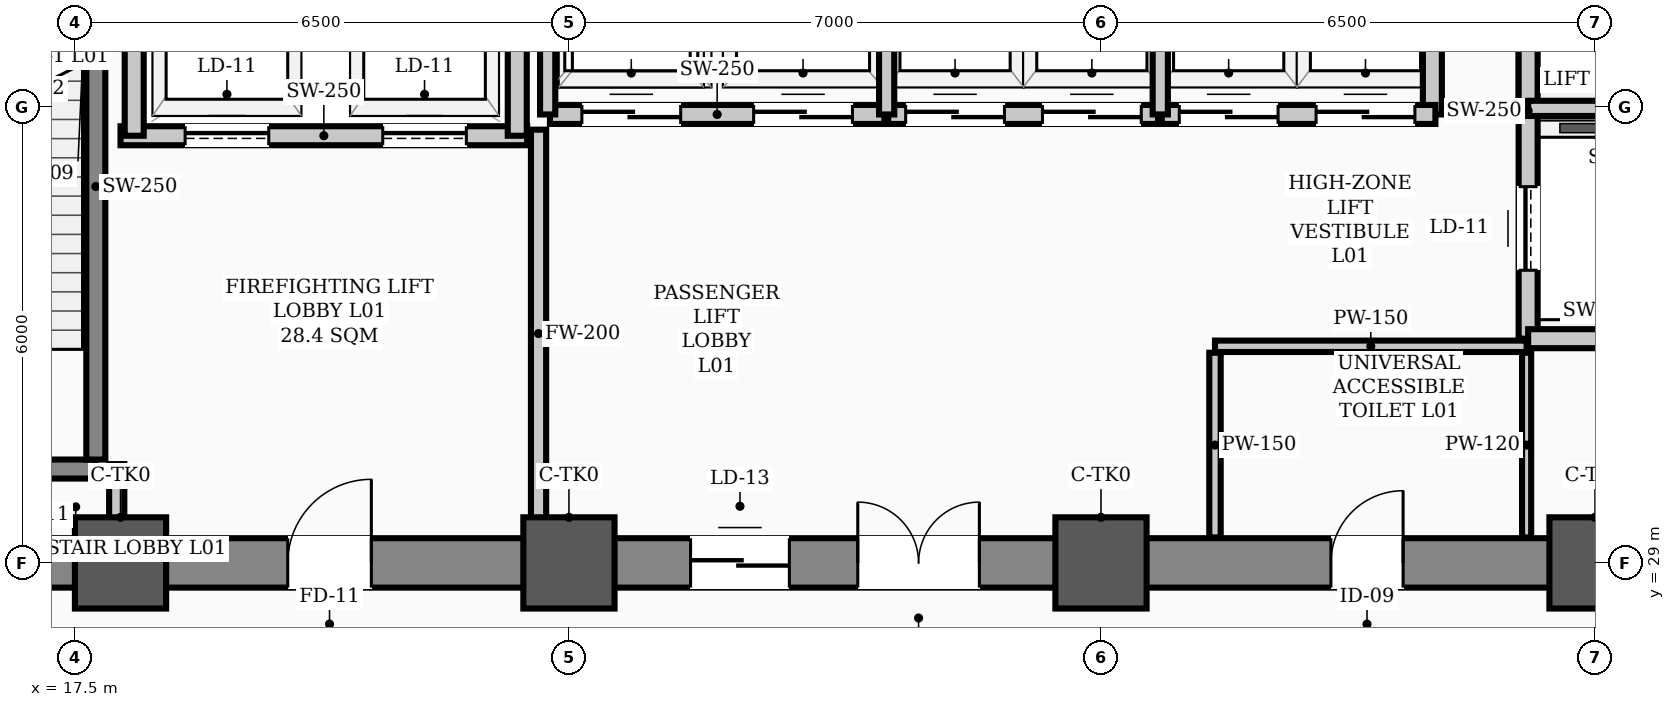
"""IFC4 building model, lengths in metres.
Left out: names, types, materials, properties, quantities, classifications, styles, units other than length and angle.
Written with IfcOpenShell. Run it as: python <this file> out.ifc"""

import sys

from ifc_helpers import new_model, si_unit, direction, frame, frame_2d, origin, origin_2d, place, context, subcontext, project, spatial, rectangle, hollow_rectangle, extrude, element, fill, save


model = new_model("IFC4")
c1 = context("Model", 3, precision=1e-05, world=origin(), true_north=direction((0.0, 1.0)))
c2 = subcontext(c1, "Body", "Model", "MODEL_VIEW")
j1 = project(units=[si_unit("LENGTHUNIT", "METRE"), si_unit("PLANEANGLEUNIT", "RADIAN")], contexts=[c1])
p1 = place(None, origin())
s1 = spatial("IfcSite", under=j1, at=p1, CompositionType="ELEMENT")
p2 = place(p1, origin())
s2 = spatial("IfcBuilding", under=s1, at=p2, CompositionType="ELEMENT")
p3 = place(p2, origin())
s3 = spatial("IfcBuildingStorey", under=s2, at=p3, CompositionType="ELEMENT", Elevation=0.0)
for number, where, z_axis, x_axis in (
    (1, (18.1, 29.0, 0.0), (0.0, 0.0, 1.0), (1.0, 0.0, 0.0)),
    (2, (24.0, 29.0, 0.0), (0.0, 0.0, 1.0), (1.0, 0.0, 0.0)),
    (3, (31.0, 29.0, 0.0), (0.0, 0.0, 1.0), (1.0, 0.0, 0.0)),
    (4, (37.5, 29.0, 0.0), (0.0, 0.0, 1.0), (1.0, 0.0, 0.0)),
):
    element("IfcColumn", number, at=place(p3, frame(where, z_axis=z_axis, x_axis=x_axis)), inside=s3, PredefinedType="COLUMN", context=c2, shape_type="SweptSolid", body=[
        extrude(hollow_rectangle(XDim=1.2, YDim=1.2, WallThickness=0.04, InnerFilletRadius=0.02, OuterFilletRadius=0.06, at=origin_2d()), origin(), (0.0, 0.0, 1.0), 5.8),
    ])
p4 = place(p3, frame((13.5, 29.0, 0.0), z_axis=(0.0, 0.0, 1.0), x_axis=(1.0, 0.0, 0.0)))
e5 = element("IfcWall", 5, at=p4, inside=s3, PredefinedType="SHEAR", context=c2, shape_type="SweptSolid", body=[
    extrude(rectangle(XDim=30.5, YDim=0.65, at=frame_2d((15.25, 0.0))), origin(), (0.0, 0.0, 1.0), 5.55),
])
p5 = place(p4, frame((1.75, 0.0, 0.0)))
e6 = element("IfcOpeningElement", 6, at=p5, cuts=e5, PredefinedType="OPENING", context=c2, shape_type="SweptSolid", body=[
    extrude(rectangle(XDim=1.1, YDim=2.08, at=frame_2d((0.55, 1.04))), frame((0.0, 0.335, 0.0), z_axis=(0.0, -1.0, 0.0), x_axis=(1.0, 0.0, 0.0)), (0.0, 0.0, 1.0), 0.67),
])
p6 = place(p4, frame((26.7, 0.0, 0.0)))
e7 = element("IfcOpeningElement", 7, at=p6, cuts=e5, PredefinedType="OPENING", context=c2, shape_type="SweptSolid", body=[
    extrude(rectangle(XDim=1.1, YDim=2.08, at=frame_2d((0.55, 1.04))), frame((0.0, 0.335, 0.0), z_axis=(0.0, -1.0, 0.0), x_axis=(1.0, 0.0, 0.0)), (0.0, 0.0, 1.0), 0.67),
])
p7 = place(p4, frame((6.8, 0.0, 0.0)))
e8 = element("IfcOpeningElement", 8, at=p7, cuts=e5, PredefinedType="OPENING", context=c2, shape_type="SweptSolid", body=[
    extrude(rectangle(XDim=1.1, YDim=2.08, at=frame_2d((0.55, 1.04))), frame((0.0, 0.335, 0.0), z_axis=(0.0, -1.0, 0.0), x_axis=(1.0, 0.0, 0.0)), (0.0, 0.0, 1.0), 0.67),
])
p8 = place(p4, frame((14.3, 0.0, 0.0)))
e9 = element("IfcOpeningElement", 9, at=p8, cuts=e5, PredefinedType="OPENING", context=c2, shape_type="SweptSolid", body=[
    extrude(rectangle(XDim=1.6, YDim=2.08, at=frame_2d((0.8, 1.04))), frame((0.0, 0.335, 0.0), z_axis=(0.0, -1.0, 0.0), x_axis=(1.0, 0.0, 0.0)), (0.0, 0.0, 1.0), 0.67),
])
p9 = place(p4, frame((20.525, 0.0, 0.0)))
e10 = element("IfcOpeningElement", 10, at=p9, cuts=e5, PredefinedType="OPENING", context=c2, shape_type="SweptSolid", body=[
    extrude(rectangle(XDim=0.95, YDim=2.08, at=frame_2d((0.475, 1.04))), frame((0.0, 0.335, 0.0), z_axis=(0.0, -1.0, 0.0), x_axis=(1.0, 0.0, 0.0)), (0.0, 0.0, 1.0), 0.67),
])
p10 = place(p4, frame((12.1, 0.0, 0.0)))
e11 = element("IfcOpeningElement", 11, at=p10, cuts=e5, PredefinedType="OPENING", context=c2, shape_type="SweptSolid", body=[
    extrude(rectangle(XDim=1.3, YDim=2.08, at=frame_2d((0.65, 1.04))), frame((0.0, 0.335, 0.0), z_axis=(0.0, -1.0, 0.0), x_axis=(1.0, 0.0, 0.0)), (0.0, 0.0, 1.0), 0.67),
])
p11 = place(p3, frame((14.43, 30.235, 0.0), z_axis=(0.0, 0.0, 1.0), x_axis=(1.0, 0.0, 0.0)))
e12 = element("IfcWall", 12, at=p11, inside=s3, PredefinedType="STANDARD", context=c2, shape_type="SweptSolid", body=[
    extrude(rectangle(XDim=3.34, YDim=0.25, at=frame_2d((1.67, 0.0))), origin(), (0.0, 0.0, 1.0), 5.55),
])
p12 = place(p11, frame((1.1, 0.0, 0.0)))
e13 = element("IfcOpeningElement", 13, at=p12, cuts=e12, PredefinedType="OPENING", context=c2, shape_type="SweptSolid", body=[
    extrude(rectangle(XDim=1.1, YDim=2.08, at=frame_2d((0.55, 1.04))), frame((0.0, 0.135, 0.0), z_axis=(0.0, -1.0, 0.0), x_axis=(1.0, 0.0, 0.0)), (0.0, 0.0, 1.0), 0.27),
])
p13 = place(p3, frame((17.775, 30.36, 0.0), z_axis=(0.0, 0.0, 1.0), x_axis=(0.0, 1.0, 0.0)))
e14 = element("IfcWall", 14, at=p13, inside=s3, PredefinedType="STANDARD", context=c2, shape_type="SweptSolid", body=[
    extrude(rectangle(XDim=7.184, YDim=0.25, at=frame_2d((3.592, 0.0))), origin(), (0.0, 0.0, 1.0), 5.55),
])
p14 = place(p3, frame((18.1, 34.62, 0.0), z_axis=(0.0, 0.0, 1.0), x_axis=(1.0, 0.0, 0.0)))
e15 = element("IfcWall", 15, at=p14, inside=s3, PredefinedType="STANDARD", context=c2, shape_type="SweptSolid", body=[
    extrude(rectangle(XDim=5.35, YDim=0.25, at=frame_2d((2.675, 0.0))), origin(), (0.0, 0.0, 1.0), 5.55),
])
p15 = place(p14, frame((0.85, 0.0, 0.0)))
e16 = element("IfcOpeningElement", 16, at=p15, cuts=e15, PredefinedType="OPENING", context=c2, shape_type="SweptSolid", body=[
    extrude(rectangle(XDim=1.1, YDim=2.08, at=frame_2d((0.55, 1.04))), frame((0.0, 0.135, 0.0), z_axis=(0.0, -1.0, 0.0), x_axis=(1.0, 0.0, 0.0)), (0.0, 0.0, 1.0), 0.27),
])
p16 = place(p14, frame((3.45, 0.0, 0.0)))
e17 = element("IfcOpeningElement", 17, at=p16, cuts=e15, PredefinedType="OPENING", context=c2, shape_type="SweptSolid", body=[
    extrude(rectangle(XDim=1.1, YDim=2.08, at=frame_2d((0.55, 1.04))), frame((0.0, 0.135, 0.0), z_axis=(0.0, -1.0, 0.0), x_axis=(1.0, 0.0, 0.0)), (0.0, 0.0, 1.0), 0.27),
])
p17 = place(p3, frame((36.62, 31.95, 0.0), z_axis=(0.0, 0.0, 1.0), x_axis=(0.0, 1.0, 0.0)))
e18 = element("IfcWall", 18, at=p17, inside=s3, PredefinedType="STANDARD", context=c2, shape_type="SweptSolid", body=[
    extrude(rectangle(XDim=6.0, YDim=0.25, at=frame_2d((3.0, 0.0))), origin(), (0.0, 0.0, 1.0), 4.73),
])
p18 = place(p17, frame((0.9, 0.0, 0.0)))
e19 = element("IfcOpeningElement", 19, at=p18, cuts=e18, PredefinedType="OPENING", context=c2, shape_type="SweptSolid", body=[
    extrude(rectangle(XDim=1.1, YDim=2.08, at=frame_2d((0.55, 1.04))), frame((0.0, 0.135, 0.0), z_axis=(0.0, -1.0, 0.0), x_axis=(1.0, 0.0, 0.0)), (0.0, 0.0, 1.0), 0.27),
])
p19 = place(p17, frame((4.0, 0.0, 0.0)))
e20 = element("IfcOpeningElement", 20, at=p19, cuts=e18, PredefinedType="OPENING", context=c2, shape_type="SweptSolid", body=[
    extrude(rectangle(XDim=1.1, YDim=2.08, at=frame_2d((0.55, 1.04))), frame((0.0, 0.135, 0.0), z_axis=(0.0, -1.0, 0.0), x_axis=(1.0, 0.0, 0.0)), (0.0, 0.0, 1.0), 0.27),
])
p20 = place(p3, frame((36.62, 31.95, 0.0), z_axis=(0.0, 0.0, 1.0), x_axis=(1.0, 0.0, 0.0)))
e21 = element("IfcWall", 21, at=p20, inside=s3, PredefinedType="STANDARD", context=c2, shape_type="SweptSolid", body=[
    extrude(rectangle(XDim=1.9, YDim=0.25, at=frame_2d((0.95, 0.0))), origin(), (0.0, 0.0, 1.0), 5.38),
])
for number, where, z_axis, x_axis in (
    (22, (18.28, 34.62, 0.0), (0.0, 0.0, 1.0), (0.0, 1.0, 0.0)),
    (23, (23.32, 34.62, 0.0), (0.0, 0.0, 1.0), (0.0, 1.0, 0.0)),
):
    element("IfcWall", number, at=place(p3, frame(where, z_axis=z_axis, x_axis=x_axis)), inside=s3, PredefinedType="STANDARD", context=c2, shape_type="SweptSolid", body=[
        extrude(rectangle(XDim=3.33, YDim=0.25, at=frame_2d((1.665, 0.0))), origin(), (0.0, 0.0, 1.0), 4.73),
    ])
p21 = place(p3, frame((35.36, 34.9, 0.0), z_axis=(0.0, 0.0, 1.0), x_axis=(0.0, 1.0, 0.0)))
e24 = element("IfcWall", 24, at=p21, inside=s3, PredefinedType="STANDARD", context=c2, shape_type="SweptSolid", body=[
    extrude(rectangle(XDim=3.05, YDim=0.25, at=frame_2d((1.525, 0.0))), origin(), (0.0, 0.0, 1.0), 4.73),
])
p22 = place(p3, frame((23.75, 34.9, 0.0), z_axis=(0.0, 0.0, 1.0), x_axis=(1.0, 0.0, 0.0)))
e25 = element("IfcWall", 25, at=p22, inside=s3, PredefinedType="STANDARD", context=c2, shape_type="SweptSolid", body=[
    extrude(rectangle(XDim=4.4, YDim=0.25, at=frame_2d((2.2, 0.0))), origin(), (0.0, 0.0, 1.0), 5.55),
])
p23 = place(p22, frame((0.42, 0.0, 0.0)))
e26 = element("IfcOpeningElement", 26, at=p23, cuts=e25, PredefinedType="OPENING", context=c2, shape_type="SweptSolid", body=[
    extrude(rectangle(XDim=1.3, YDim=2.08, at=frame_2d((0.65, 1.04))), frame((0.0, 0.135, 0.0), z_axis=(0.0, -1.0, 0.0), x_axis=(1.0, 0.0, 0.0)), (0.0, 0.0, 1.0), 0.27),
])
p24 = place(p22, frame((2.68, 0.0, 0.0)))
e27 = element("IfcOpeningElement", 27, at=p24, cuts=e25, PredefinedType="OPENING", context=c2, shape_type="SweptSolid", body=[
    extrude(rectangle(XDim=1.3, YDim=2.08, at=frame_2d((0.65, 1.04))), frame((0.0, 0.135, 0.0), z_axis=(0.0, -1.0, 0.0), x_axis=(1.0, 0.0, 0.0)), (0.0, 0.0, 1.0), 0.27),
])
p25 = place(p3, frame((28.2, 34.9, 0.0), z_axis=(0.0, 0.0, 1.0), x_axis=(1.0, 0.0, 0.0)))
e28 = element("IfcWall", 28, at=p25, inside=s3, PredefinedType="STANDARD", context=c2, shape_type="SweptSolid", body=[
    extrude(rectangle(XDim=3.55, YDim=0.25, at=frame_2d((1.775, 0.0))), origin(), (0.0, 0.0, 1.0), 5.55),
])
p26 = place(p25, frame((0.23, 0.0, 0.0)))
e29 = element("IfcOpeningElement", 29, at=p26, cuts=e28, PredefinedType="OPENING", context=c2, shape_type="SweptSolid", body=[
    extrude(rectangle(XDim=1.3, YDim=2.08, at=frame_2d((0.65, 1.04))), frame((0.0, 0.135, 0.0), z_axis=(0.0, -1.0, 0.0), x_axis=(1.0, 0.0, 0.0)), (0.0, 0.0, 1.0), 0.27),
])
p27 = place(p25, frame((2.03, 0.0, 0.0)))
e30 = element("IfcOpeningElement", 30, at=p27, cuts=e28, PredefinedType="OPENING", context=c2, shape_type="SweptSolid", body=[
    extrude(rectangle(XDim=1.3, YDim=2.08, at=frame_2d((0.65, 1.04))), frame((0.0, 0.135, 0.0), z_axis=(0.0, -1.0, 0.0), x_axis=(1.0, 0.0, 0.0)), (0.0, 0.0, 1.0), 0.27),
])
p28 = place(p3, frame((31.8, 34.9, 0.0), z_axis=(0.0, 0.0, 1.0), x_axis=(1.0, 0.0, 0.0)))
e31 = element("IfcWall", 31, at=p28, inside=s3, PredefinedType="STANDARD", context=c2, shape_type="SweptSolid", body=[
    extrude(rectangle(XDim=3.6, YDim=0.25, at=frame_2d((1.8, 0.0))), origin(), (0.0, 0.0, 1.0), 5.55),
])
p29 = place(p28, frame((0.23, 0.0, 0.0)))
e32 = element("IfcOpeningElement", 32, at=p29, cuts=e31, PredefinedType="OPENING", context=c2, shape_type="SweptSolid", body=[
    extrude(rectangle(XDim=1.3, YDim=2.08, at=frame_2d((0.65, 1.04))), frame((0.0, 0.135, 0.0), z_axis=(0.0, -1.0, 0.0), x_axis=(1.0, 0.0, 0.0)), (0.0, 0.0, 1.0), 0.27),
])
p30 = place(p28, frame((2.03, 0.0, 0.0)))
e33 = element("IfcOpeningElement", 33, at=p30, cuts=e31, PredefinedType="OPENING", context=c2, shape_type="SweptSolid", body=[
    extrude(rectangle(XDim=1.3, YDim=2.08, at=frame_2d((0.65, 1.04))), frame((0.0, 0.135, 0.0), z_axis=(0.0, -1.0, 0.0), x_axis=(1.0, 0.0, 0.0)), (0.0, 0.0, 1.0), 0.27),
])
p31 = place(p3, frame((32.5, 31.85, 0.0), z_axis=(0.0, 0.0, 1.0), x_axis=(1.0, 0.0, 0.0)))
e34 = element("IfcWall", 34, at=p31, inside=s3, PredefinedType="PARTITIONING", context=c2, shape_type="SweptSolid", body=[
    extrude(rectangle(XDim=4.1, YDim=0.15, at=frame_2d((2.05, 0.0))), origin(), (0.0, 0.0, 1.0), 5.55),
])
p32 = place(p3, frame((18.05, 29.335, 0.0), z_axis=(0.0, 0.0, 1.0), x_axis=(0.0, 1.0, 0.0)))
e35 = element("IfcWall", 35, at=p32, inside=s3, PredefinedType="STANDARD", context=c2, shape_type="SweptSolid", body=[
    extrude(rectangle(XDim=0.965, YDim=0.2, at=frame_2d((0.482, 0.0))), origin(), (0.0, 0.0, 1.0), 4.73),
])
p33 = place(p3, frame((23.6, 29.335, 0.0), z_axis=(0.0, 0.0, 1.0), x_axis=(0.0, 1.0, 0.0)))
e36 = element("IfcWall", 36, at=p33, inside=s3, PredefinedType="STANDARD", context=c2, shape_type="SweptSolid", body=[
    extrude(rectangle(XDim=5.365, YDim=0.2, at=frame_2d((2.683, 0.0))), origin(), (0.0, 0.0, 1.0), 4.73),
])
p34 = place(p3, frame((32.5, 29.335, 0.0), z_axis=(0.0, 0.0, 1.0), x_axis=(0.0, 1.0, 0.0)))
e37 = element("IfcWall", 37, at=p34, inside=s3, PredefinedType="PARTITIONING", context=c2, shape_type="SweptSolid", body=[
    extrude(rectangle(XDim=2.43, YDim=0.15, at=frame_2d((1.215, 0.0))), origin(), (0.0, 0.0, 1.0), 4.73),
])
p35 = place(p3, frame((36.6, 29.335, 0.0), z_axis=(0.0, 0.0, 1.0), x_axis=(0.0, 1.0, 0.0)))
e38 = element("IfcWall", 38, at=p35, inside=s3, PredefinedType="PARTITIONING", context=c2, shape_type="SweptSolid", body=[
    extrude(rectangle(XDim=2.43, YDim=0.12, at=frame_2d((1.215, 0.0))), origin(), (0.0, 0.0, 1.0), 4.73),
])
p36 = place(p3, frame((36.62, 34.98, 0.0), z_axis=(0.0, 0.0, 1.0), x_axis=(1.0, 0.0, 0.0)))
e39 = element("IfcWall", 39, at=p36, inside=s3, PredefinedType="STANDARD", context=c2, shape_type="SweptSolid", body=[
    extrude(rectangle(XDim=1.9, YDim=0.2, at=frame_2d((0.95, 0.0))), origin(), (0.0, 0.0, 1.0), 5.55),
])
for number, where, z_axis, x_axis in (
    (40, (23.72, 34.9, 0.0), (0.0, 0.0, 1.0), (0.0, 1.0, 0.0)),
    (41, (28.18, 34.9, 0.0), (0.0, 0.0, 1.0), (0.0, 1.0, 0.0)),
    (42, (31.78, 34.9, 0.0), (0.0, 0.0, 1.0), (0.0, 1.0, 0.0)),
):
    element("IfcWall", number, at=place(p3, frame(where, z_axis=z_axis, x_axis=x_axis)), inside=s3, PredefinedType="STANDARD", context=c2, shape_type="SweptSolid", body=[
        extrude(rectangle(XDim=3.12, YDim=0.2, at=frame_2d((1.56, 0.0))), origin(), (0.0, 0.0, 1.0), 4.73),
    ])
p37 = place(p7, origin())
e43 = element("IfcDoor", 43, at=p37, inside=s3, OperationType="SINGLE_SWING_RIGHT", PredefinedType="DOOR", context=c2, shape_type="SweptSolid", body=[
    extrude(rectangle(XDim=1.1, YDim=2.08, at=frame_2d((0.55, 1.04))), frame((0.0, 0.025, 0.0), z_axis=(0.0, -1.0, 0.0), x_axis=(1.0, 0.0, 0.0)), (0.0, 0.0, 1.0), 0.05),
])
fill(e8, e43)
p38 = place(p8, origin())
e44 = element("IfcDoor", 44, at=p38, inside=s3, OperationType="DOUBLE_DOOR_SINGLE_SWING", PredefinedType="DOOR", context=c2, shape_type="SweptSolid", body=[
    extrude(rectangle(XDim=1.6, YDim=2.08, at=frame_2d((0.8, 1.04))), frame((0.0, 0.025, 0.0), z_axis=(0.0, -1.0, 0.0), x_axis=(1.0, 0.0, 0.0)), (0.0, 0.0, 1.0), 0.05),
])
fill(e9, e44)
p39 = place(p9, origin())
e45 = element("IfcDoor", 45, at=p39, inside=s3, OperationType="SINGLE_SWING_RIGHT", PredefinedType="DOOR", context=c2, shape_type="SweptSolid", body=[
    extrude(rectangle(XDim=0.95, YDim=2.08, at=frame_2d((0.475, 1.04))), frame((0.0, 0.025, 0.0), z_axis=(0.0, -1.0, 0.0), x_axis=(1.0, 0.0, 0.0)), (0.0, 0.0, 1.0), 0.05),
])
fill(e10, e45)
p40 = place(p15, origin())
e46 = element("IfcDoor", 46, at=p40, inside=s3, OperationType="SLIDING_TO_LEFT", PredefinedType="DOOR", context=c2, shape_type="SweptSolid", body=[
    extrude(rectangle(XDim=1.1, YDim=2.08, at=frame_2d((0.55, 1.04))), frame((0.0, 0.025, 0.0), z_axis=(0.0, -1.0, 0.0), x_axis=(1.0, 0.0, 0.0)), (0.0, 0.0, 1.0), 0.05),
])
fill(e16, e46)
p41 = place(p16, origin())
e47 = element("IfcDoor", 47, at=p41, inside=s3, OperationType="SLIDING_TO_LEFT", PredefinedType="DOOR", context=c2, shape_type="SweptSolid", body=[
    extrude(rectangle(XDim=1.1, YDim=2.08, at=frame_2d((0.55, 1.04))), frame((0.0, 0.025, 0.0), z_axis=(0.0, -1.0, 0.0), x_axis=(1.0, 0.0, 0.0)), (0.0, 0.0, 1.0), 0.05),
])
fill(e17, e47)
p42 = place(p18, origin())
e48 = element("IfcDoor", 48, at=p42, inside=s3, OperationType="SLIDING_TO_LEFT", PredefinedType="DOOR", context=c2, shape_type="SweptSolid", body=[
    extrude(rectangle(XDim=1.1, YDim=2.08, at=frame_2d((0.55, 1.04))), frame((0.0, 0.025, 0.0), z_axis=(0.0, -1.0, 0.0), x_axis=(1.0, 0.0, 0.0)), (0.0, 0.0, 1.0), 0.05),
])
fill(e19, e48)
p43 = place(p23, origin())
e49 = element("IfcDoor", 49, at=p43, inside=s3, OperationType="DOUBLE_DOOR_SLIDING", PredefinedType="DOOR", context=c2, shape_type="SweptSolid", body=[
    extrude(rectangle(XDim=1.3, YDim=2.08, at=frame_2d((0.65, 1.04))), frame((0.0, 0.025, 0.0), z_axis=(0.0, -1.0, 0.0), x_axis=(1.0, 0.0, 0.0)), (0.0, 0.0, 1.0), 0.05),
])
fill(e26, e49)
p44 = place(p24, origin())
e50 = element("IfcDoor", 50, at=p44, inside=s3, OperationType="DOUBLE_DOOR_SLIDING", PredefinedType="DOOR", context=c2, shape_type="SweptSolid", body=[
    extrude(rectangle(XDim=1.3, YDim=2.08, at=frame_2d((0.65, 1.04))), frame((0.0, 0.025, 0.0), z_axis=(0.0, -1.0, 0.0), x_axis=(1.0, 0.0, 0.0)), (0.0, 0.0, 1.0), 0.05),
])
fill(e27, e50)
p45 = place(p26, origin())
e51 = element("IfcDoor", 51, at=p45, inside=s3, OperationType="DOUBLE_DOOR_SLIDING", PredefinedType="DOOR", context=c2, shape_type="SweptSolid", body=[
    extrude(rectangle(XDim=1.3, YDim=2.08, at=frame_2d((0.65, 1.04))), frame((0.0, 0.025, 0.0), z_axis=(0.0, -1.0, 0.0), x_axis=(1.0, 0.0, 0.0)), (0.0, 0.0, 1.0), 0.05),
])
fill(e29, e51)
p46 = place(p27, origin())
e52 = element("IfcDoor", 52, at=p46, inside=s3, OperationType="DOUBLE_DOOR_SLIDING", PredefinedType="DOOR", context=c2, shape_type="SweptSolid", body=[
    extrude(rectangle(XDim=1.3, YDim=2.08, at=frame_2d((0.65, 1.04))), frame((0.0, 0.025, 0.0), z_axis=(0.0, -1.0, 0.0), x_axis=(1.0, 0.0, 0.0)), (0.0, 0.0, 1.0), 0.05),
])
fill(e30, e52)
p47 = place(p29, origin())
e53 = element("IfcDoor", 53, at=p47, inside=s3, OperationType="DOUBLE_DOOR_SLIDING", PredefinedType="DOOR", context=c2, shape_type="SweptSolid", body=[
    extrude(rectangle(XDim=1.3, YDim=2.08, at=frame_2d((0.65, 1.04))), frame((0.0, 0.025, 0.0), z_axis=(0.0, -1.0, 0.0), x_axis=(1.0, 0.0, 0.0)), (0.0, 0.0, 1.0), 0.05),
])
fill(e32, e53)
p48 = place(p30, origin())
e54 = element("IfcDoor", 54, at=p48, inside=s3, OperationType="DOUBLE_DOOR_SLIDING", PredefinedType="DOOR", context=c2, shape_type="SweptSolid", body=[
    extrude(rectangle(XDim=1.3, YDim=2.08, at=frame_2d((0.65, 1.04))), frame((0.0, 0.025, 0.0), z_axis=(0.0, -1.0, 0.0), x_axis=(1.0, 0.0, 0.0)), (0.0, 0.0, 1.0), 0.05),
])
fill(e33, e54)
p49 = place(p10, origin())
e55 = element("IfcDoor", 55, at=p49, inside=s3, OperationType="DOUBLE_DOOR_SLIDING", PredefinedType="DOOR", context=c2, shape_type="SweptSolid", body=[
    extrude(rectangle(XDim=1.3, YDim=2.08, at=frame_2d((0.65, 1.04))), frame((0.0, 0.025, 0.0), z_axis=(0.0, -1.0, 0.0), x_axis=(1.0, 0.0, 0.0)), (0.0, 0.0, 1.0), 0.05),
])
fill(e11, e55)
save(model, sys.argv[1])
